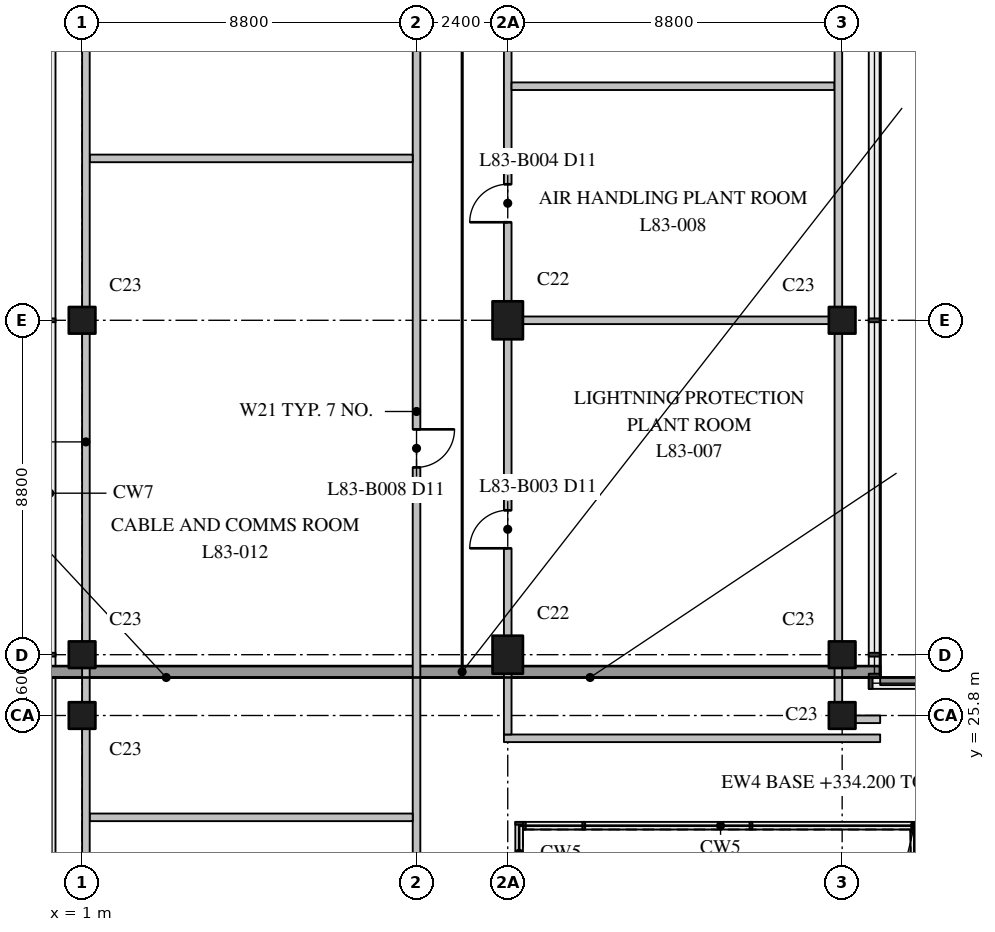
"""IFC4 building model, lengths in metres.
Left out: names, types, materials, properties, quantities, classifications, styles, units other than length and angle.
Written with IfcOpenShell. Run it as: python <this file> out.ifc"""

import sys

from ifc_helpers import new_model, si_unit, direction, frame, frame_2d, origin, origin_2d, place, context, subcontext, project, spatial, polyline, rectangle, outline, extrude, element, fill, save


model = new_model("IFC4")
c1 = context("Model", 3, precision=1e-05, world=origin(), true_north=direction((0.0, 1.0)))
c2 = subcontext(c1, "Body", "Model", "MODEL_VIEW")
j1 = project(units=[si_unit("LENGTHUNIT", "METRE"), si_unit("PLANEANGLEUNIT", "RADIAN")], contexts=[c1])
p1 = place(None, origin())
s1 = spatial("IfcSite", under=j1, at=p1, CompositionType="ELEMENT")
p2 = place(p1, origin())
s2 = spatial("IfcBuilding", under=s1, at=p2, CompositionType="ELEMENT")
p3 = place(p2, frame((0.0, 0.0, 330.2)))
s3 = spatial("IfcBuildingStorey", under=s2, at=p3, CompositionType="ELEMENT", Elevation=330.2)
for number, where, z_axis, x_axis in (
    (1, (1.0, 25.8, 0.0), (0.0, 0.0, 1.0), (1.0, 0.0, 0.0)),
    (2, (1.0, 27.4, 0.0), (0.0, 0.0, 1.0), (1.0, 0.0, 0.0)),
    (3, (1.0, 36.2, 0.0), (0.0, 0.0, 1.0), (1.0, 0.0, 0.0)),
):
    element("IfcColumn", number, at=place(p3, frame(where, z_axis=z_axis, x_axis=x_axis)), inside=s3, PredefinedType="COLUMN", context=c2, shape_type="SweptSolid", body=[
        extrude(rectangle(XDim=0.7, YDim=0.7, at=origin_2d()), origin(), (0.0, 0.0, 1.0), 4.0),
    ])
for number, where, z_axis, x_axis in (
    (4, (12.2, 27.4, 0.0), (0.0, 0.0, 1.0), (0.0, 1.0, 0.0)),
    (5, (12.2, 36.2, 0.0), (0.0, 0.0, 1.0), (0.0, 1.0, 0.0)),
):
    element("IfcColumn", number, at=place(p3, frame(where, z_axis=z_axis, x_axis=x_axis)), inside=s3, PredefinedType="COLUMN", context=c2, shape_type="SweptSolid", body=[
        extrude(rectangle(XDim=1.0, YDim=0.8, at=origin_2d()), origin(), (0.0, 0.0, 1.0), 4.0),
    ])
for number, where, z_axis, x_axis in (
    (6, (21.0, 25.8, 0.0), (0.0, 0.0, 1.0), (1.0, 0.0, 0.0)),
    (7, (21.0, 27.4, 0.0), (0.0, 0.0, 1.0), (1.0, 0.0, 0.0)),
    (8, (21.0, 36.2, 0.0), (0.0, 0.0, 1.0), (1.0, 0.0, 0.0)),
):
    element("IfcColumn", number, at=place(p3, frame(where, z_axis=z_axis, x_axis=x_axis)), inside=s3, PredefinedType="COLUMN", context=c2, shape_type="SweptSolid", body=[
        extrude(rectangle(XDim=0.7, YDim=0.7, at=origin_2d()), origin(), (0.0, 0.0, 1.0), 4.0),
    ])
p4 = place(p3, frame((0.0, 26.95, 4.0), z_axis=(0.0, 0.0, 1.0), x_axis=(1.0, 0.0, 0.0)))
e9 = element("IfcWall", 9, at=p4, inside=s3, PredefinedType="STANDARD", context=c2, shape_type="SweptSolid", body=[
    extrude(outline(polyline([(0.0, 0.0), (22.0, 0.0), (22.0, 0.0), (11.0, 8.677), (0.0, 0.0), (0.0, 0.0)])), frame((0.0, 0.15, 0.0), z_axis=(0.0, -1.0, 0.0), x_axis=(1.0, 0.0, 0.0)), (0.0, 0.0, 1.0), 0.3),
])
p5 = place(p3, frame((26.8, 26.7, 4.0), z_axis=(0.0, 0.0, 1.0), x_axis=(-1.0, 0.0, 0.0)))
e10 = element("IfcWall", 10, at=p5, inside=s3, PredefinedType="PARAPET", context=c2, shape_type="SweptSolid", body=[
    extrude(rectangle(XDim=4.8, YDim=0.2, at=frame_2d((2.4, 0.0))), origin(), (0.0, 0.0, 1.0), 1.1),
])
p6 = place(p3, frame((0.1, 26.8, 4.0), z_axis=(0.0, 0.0, 1.0), x_axis=(0.0, -1.0, 0.0)))
e11 = element("IfcWall", 11, at=p6, inside=s3, PredefinedType="PARAPET", context=c2, shape_type="SweptSolid", body=[
    extrude(rectangle(XDim=24.6, YDim=0.2, at=frame_2d((12.3, 0.0))), origin(), (0.0, 0.0, 1.0), 1.1),
])
p7 = place(p3, frame((12.1, 25.2, 0.0), z_axis=(0.0, 0.0, 1.0), x_axis=(1.0, 0.0, 0.0)))
e12 = element("IfcWall", 12, at=p7, inside=s3, PredefinedType="PARTITIONING", context=c2, shape_type="SweptSolid", body=[
    extrude(rectangle(XDim=9.9, YDim=0.2, at=frame_2d((4.95, 0.0))), origin(), (0.0, 0.0, 1.0), 3.65),
])
for number, where, z_axis, x_axis in (
    (13, (12.3, 36.2, 0.0), (0.0, 0.0, 1.0), (1.0, 0.0, 0.0)),
    (14, (12.3, 42.36, 0.0), (0.0, 0.0, 1.0), (1.0, 0.0, 0.0)),
    (15, (1.2, 23.12, 0.0), (0.0, 0.0, 1.0), (1.0, 0.0, 0.0)),
    (16, (1.2, 40.46, 0.0), (0.0, 0.0, 1.0), (1.0, 0.0, 0.0)),
):
    element("IfcWall", number, at=place(p3, frame(where, z_axis=z_axis, x_axis=x_axis)), inside=s3, PredefinedType="PARTITIONING", context=c2, shape_type="SweptSolid", body=[
        extrude(rectangle(XDim=8.5, YDim=0.2, at=frame_2d((4.25, 0.0))), origin(), (0.0, 0.0, 1.0), 3.65),
    ])
p8 = place(p3, frame((20.8, 25.7, 0.0), z_axis=(0.0, 0.0, 1.0), x_axis=(1.0, 0.0, 0.0)))
e17 = element("IfcWall", 17, at=p8, inside=s3, PredefinedType="PARTITIONING", context=c2, shape_type="SweptSolid", body=[
    extrude(rectangle(XDim=1.2, YDim=0.2, at=frame_2d((0.6, 0.0))), origin(), (0.0, 0.0, 1.0), 3.038),
])
p9 = place(p3, frame((9.8, 9.8, 0.0), z_axis=(0.0, 0.0, 1.0), x_axis=(0.0, 1.0, 0.0)))
e18 = element("IfcWall", 18, at=p9, inside=s3, PredefinedType="PARTITIONING", context=c2, shape_type="SweptSolid", body=[
    extrude(rectangle(XDim=48.0, YDim=0.2, at=frame_2d((24.0, 0.0))), origin(), (0.0, 0.0, 1.0), 3.65),
])
p10 = place(p9, frame((6.16, 0.0, 0.0)))
e19 = element("IfcOpeningElement", 19, at=p10, cuts=e18, PredefinedType="OPENING", context=c2, shape_type="SweptSolid", body=[
    extrude(rectangle(XDim=1.0, YDim=2.1, at=frame_2d((0.5, 1.05))), frame((0.0, 0.11, 0.0), z_axis=(0.0, -1.0, 0.0), x_axis=(1.0, 0.0, 0.0)), (0.0, 0.0, 1.0), 0.22),
])
p11 = place(p9, frame((22.53, 0.0, 0.0)))
e20 = element("IfcOpeningElement", 20, at=p11, cuts=e18, PredefinedType="OPENING", context=c2, shape_type="SweptSolid", body=[
    extrude(rectangle(XDim=1.0, YDim=2.1, at=frame_2d((0.5, 1.05))), frame((0.0, 0.11, 0.0), z_axis=(0.0, -1.0, 0.0), x_axis=(1.0, 0.0, 0.0)), (0.0, 0.0, 1.0), 0.22),
])
p12 = place(p9, frame((37.83, 0.0, 0.0)))
e21 = element("IfcOpeningElement", 21, at=p12, cuts=e18, PredefinedType="OPENING", context=c2, shape_type="SweptSolid", body=[
    extrude(rectangle(XDim=1.0, YDim=2.1, at=frame_2d((0.5, 1.05))), frame((0.0, 0.11, 0.0), z_axis=(0.0, -1.0, 0.0), x_axis=(1.0, 0.0, 0.0)), (0.0, 0.0, 1.0), 0.22),
])
p13 = place(p3, frame((12.2, 25.3, 0.0), z_axis=(0.0, 0.0, 1.0), x_axis=(0.0, 1.0, 0.0)))
e22 = element("IfcWall", 22, at=p13, inside=s3, PredefinedType="PARTITIONING", context=c2, shape_type="SweptSolid", body=[
    extrude(rectangle(XDim=37.1, YDim=0.2, at=frame_2d((18.55, 0.0))), origin(), (0.0, 0.0, 1.0), 3.65),
])
p14 = place(p13, frame((4.9, 0.0, 0.0)))
e23 = element("IfcOpeningElement", 23, at=p14, cuts=e22, PredefinedType="OPENING", context=c2, shape_type="SweptSolid", body=[
    extrude(rectangle(XDim=1.0, YDim=2.1, at=frame_2d((0.5, 1.05))), frame((0.0, 0.11, 0.0), z_axis=(0.0, -1.0, 0.0), x_axis=(1.0, 0.0, 0.0)), (0.0, 0.0, 1.0), 0.22),
])
p15 = place(p13, frame((13.48, 0.0, 0.0)))
e24 = element("IfcOpeningElement", 24, at=p15, cuts=e22, PredefinedType="OPENING", context=c2, shape_type="SweptSolid", body=[
    extrude(rectangle(XDim=1.0, YDim=2.1, at=frame_2d((0.5, 1.05))), frame((0.0, 0.11, 0.0), z_axis=(0.0, -1.0, 0.0), x_axis=(1.0, 0.0, 0.0)), (0.0, 0.0, 1.0), 0.22),
])
p16 = place(p13, frame((22.28, 0.0, 0.0)))
e25 = element("IfcOpeningElement", 25, at=p16, cuts=e22, PredefinedType="OPENING", context=c2, shape_type="SweptSolid", body=[
    extrude(rectangle(XDim=1.0, YDim=2.1, at=frame_2d((0.5, 1.05))), frame((0.0, 0.11, 0.0), z_axis=(0.0, -1.0, 0.0), x_axis=(1.0, 0.0, 0.0)), (0.0, 0.0, 1.0), 0.22),
])
p17 = place(p13, frame((33.35, 0.0, 0.0)))
e26 = element("IfcOpeningElement", 26, at=p17, cuts=e22, PredefinedType="OPENING", context=c2, shape_type="SweptSolid", body=[
    extrude(rectangle(XDim=1.0, YDim=2.1, at=frame_2d((0.5, 1.05))), frame((0.0, 0.11, 0.0), z_axis=(0.0, -1.0, 0.0), x_axis=(1.0, 0.0, 0.0)), (0.0, 0.0, 1.0), 0.22),
])
p18 = place(p3, frame((20.9, 25.8, 0.0), z_axis=(0.0, 0.0, 1.0), x_axis=(0.0, 1.0, 0.0)))
e27 = element("IfcWall", 27, at=p18, inside=s3, PredefinedType="PARTITIONING", context=c2, shape_type="SweptSolid", body=[
    extrude(rectangle(XDim=30.05, YDim=0.2, at=frame_2d((15.025, 0.0))), origin(), (0.0, 0.0, 1.0), 3.294),
])
p19 = place(p3, frame((1.1, 10.15, 0.0), z_axis=(0.0, 0.0, 1.0), x_axis=(0.0, 1.0, 0.0)))
e28 = element("IfcWall", 28, at=p19, inside=s3, PredefinedType="PARTITIONING", context=c2, shape_type="SweptSolid", body=[
    extrude(rectangle(XDim=45.7, YDim=0.2, at=frame_2d((22.85, 0.0))), origin(), (0.0, 0.0, 1.0), 3.294),
])
p20 = place(p14, origin())
e29 = element("IfcDoor", 29, at=p20, inside=s3, OperationType="SINGLE_SWING_LEFT", PredefinedType="DOOR", context=c2, shape_type="SweptSolid", body=[
    extrude(rectangle(XDim=1.0, YDim=2.1, at=frame_2d((0.5, 1.05))), frame((0.0, 0.025, 0.0), z_axis=(0.0, -1.0, 0.0), x_axis=(1.0, 0.0, 0.0)), (0.0, 0.0, 1.0), 0.05),
])
fill(e23, e29)
p21 = place(p15, origin())
e30 = element("IfcDoor", 30, at=p21, inside=s3, OperationType="SINGLE_SWING_LEFT", PredefinedType="DOOR", context=c2, shape_type="SweptSolid", body=[
    extrude(rectangle(XDim=1.0, YDim=2.1, at=frame_2d((0.5, 1.05))), frame((0.0, 0.025, 0.0), z_axis=(0.0, -1.0, 0.0), x_axis=(1.0, 0.0, 0.0)), (0.0, 0.0, 1.0), 0.05),
])
fill(e24, e30)
p22 = place(p11, frame((1.0, 0.0, 0.0), z_axis=(0.0, 0.0, 1.0), x_axis=(-1.0, 0.0, 0.0)))
e31 = element("IfcDoor", 31, at=p22, inside=s3, OperationType="SINGLE_SWING_RIGHT", PredefinedType="DOOR", context=c2, shape_type="SweptSolid", body=[
    extrude(rectangle(XDim=1.0, YDim=2.1, at=frame_2d((0.5, 1.05))), frame((0.0, 0.025, 0.0), z_axis=(0.0, -1.0, 0.0), x_axis=(1.0, 0.0, 0.0)), (0.0, 0.0, 1.0), 0.05),
])
fill(e20, e31)
save(model, sys.argv[1])
